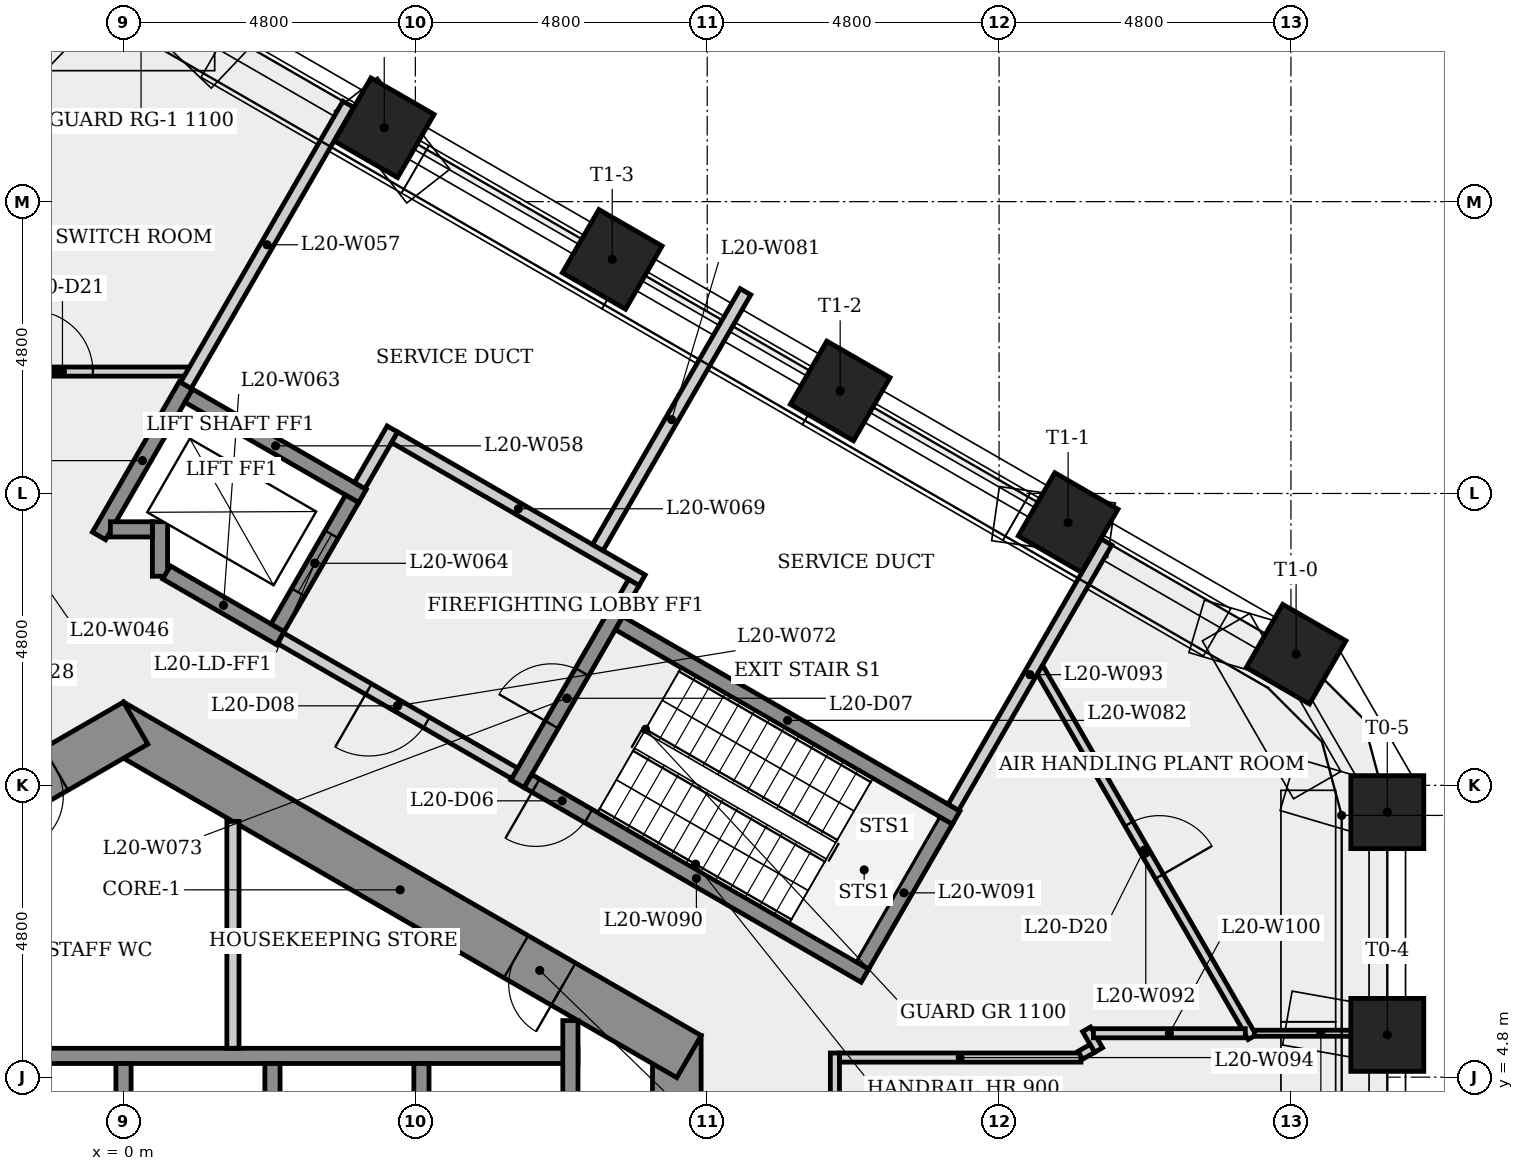
"""IFC4 building model, lengths in metres.
Left out: names, types, materials, properties, quantities, classifications, styles, units other than length and angle.
Written with IfcOpenShell. Run it as: python <this file> out.ifc"""

import sys

from ifc_helpers import new_model, si_unit, direction, frame, frame_2d, origin, origin_2d, place, context, subcontext, project, spatial, rectangle, extrude, element, fill, save


model = new_model("IFC4")
c1 = context("Model", 3, precision=1e-05, world=origin(), true_north=direction((0.0, 1.0)))
c2 = subcontext(c1, "Body", "Model", "MODEL_VIEW")
j1 = project(units=[si_unit("LENGTHUNIT", "METRE"), si_unit("PLANEANGLEUNIT", "RADIAN")], contexts=[c1])
p1 = place(None, origin())
s1 = spatial("IfcSite", under=j1, at=p1, CompositionType="ELEMENT")
p2 = place(p1, origin())
s2 = spatial("IfcBuilding", under=s1, at=p2, CompositionType="ELEMENT")
p3 = place(p2, frame((0.0, 0.0, 78.3)))
s3 = spatial("IfcBuildingStorey", under=s2, at=p3, CompositionType="ELEMENT", Elevation=78.3)
p4 = place(p3, frame((9.1, -5.485, 0.0), z_axis=(0.0, 0.0, 1.0), x_axis=(0.0, 1.0, 0.0)))
e1 = element("IfcWall", 1, at=p4, inside=s3, PredefinedType="SHEAR", context=c2, shape_type="SweptSolid", body=[
    extrude(rectangle(XDim=10.97, YDim=0.8, at=frame_2d((5.485, 0.0))), origin(), (0.0, 0.0, 1.0), 4.8),
])
p5 = place(p4, frame((4.685, 0.0, 0.0)))
e2 = element("IfcOpeningElement", 2, at=p5, cuts=e1, PredefinedType="OPENING", context=c2, shape_type="SweptSolid", body=[
    extrude(rectangle(XDim=1.6, YDim=2.1, at=frame_2d((0.8, 1.05))), frame((0.0, 0.41, 0.0), z_axis=(0.0, -1.0, 0.0), x_axis=(1.0, 0.0, 0.0)), (0.0, 0.0, 1.0), 0.82),
])
p6 = place(p3, frame((9.3, 5.138, 0.0), z_axis=(0.0, 0.0, 1.0), x_axis=(-0.866023993627, 0.500002442456, 0.0)))
e3 = element("IfcWall", 3, at=p6, inside=s3, PredefinedType="SHEAR", context=c2, shape_type="SweptSolid", body=[
    extrude(rectangle(XDim=10.97, YDim=0.8, at=frame_2d((5.485, 0.0))), origin(), (0.0, 0.0, 1.0), 4.8),
])
p7 = place(p6, frame((2.384, 0.0, 0.0)))
e4 = element("IfcOpeningElement", 4, at=p7, cuts=e3, PredefinedType="OPENING", context=c2, shape_type="SweptSolid", body=[
    extrude(rectangle(XDim=0.9, YDim=2.1, at=frame_2d((0.45, 1.05))), frame((0.0, 0.41, 0.0), z_axis=(0.0, -1.0, 0.0), x_axis=(1.0, 0.0, 0.0)), (0.0, 0.0, 1.0), 0.82),
])
p8 = place(p3, frame((0.2, 10.623, 0.0), z_axis=(0.0, 0.0, 1.0), x_axis=(-0.866023993627, -0.500002442456, 0.0)))
e5 = element("IfcWall", 5, at=p8, inside=s3, PredefinedType="SHEAR", context=c2, shape_type="SweptSolid", body=[
    extrude(rectangle(XDim=10.97, YDim=0.8, at=frame_2d((5.485, 0.0))), origin(), (0.0, 0.0, 1.0), 4.8),
])
p9 = place(p8, frame((7.947, 0.0, 0.0)))
e6 = element("IfcOpeningElement", 6, at=p9, cuts=e5, PredefinedType="OPENING", context=c2, shape_type="SweptSolid", body=[
    extrude(rectangle(XDim=0.9, YDim=2.1, at=frame_2d((0.45, 1.05))), frame((0.0, 0.41, 0.0), z_axis=(0.0, -1.0, 0.0), x_axis=(1.0, 0.0, 0.0)), (0.0, 0.0, 1.0), 0.82),
])
p10 = place(p8, frame((1.514, 0.0, 0.0)))
e7 = element("IfcOpeningElement", 7, at=p10, cuts=e5, PredefinedType="OPENING", context=c2, shape_type="SweptSolid", body=[
    extrude(rectangle(XDim=0.9, YDim=2.1, at=frame_2d((0.45, 1.05))), frame((0.0, 0.41, 0.0), z_axis=(0.0, -1.0, 0.0), x_axis=(1.0, 0.0, 0.0)), (0.0, 0.0, 1.0), 0.82),
])
for number, where, z_axis, x_axis in (
    (8, (20.785, 5.495, 0.0), (0.0, 0.0, 1.0), (1.0, 0.0, 0.0)),
    (9, (20.785, 9.159, 0.0), (0.0, 0.0, 1.0), (1.0, 0.0, 0.0)),
    (10, (19.285, 11.757, 0.0), (0.0, 0.0, 1.0), (0.5, 0.866, 0.0)),
    (11, (15.536, 13.921, 0.0), (0.0, 0.0, 1.0), (0.5, 0.866, 0.0)),
    (12, (11.787, 16.086, 0.0), (0.0, 0.0, 1.0), (0.5, 0.866, 0.0)),
    (13, (8.038, 18.25, 0.0), (0.0, 0.0, 1.0), (0.5, 0.866, 0.0)),
    (14, (4.289, 20.415, 0.0), (0.0, 0.0, 1.0), (0.5, 0.866, 0.0)),
):
    element("IfcColumn", number, at=place(p3, frame(where, z_axis=z_axis, x_axis=x_axis)), inside=s3, PredefinedType="COLUMN", context=c2, shape_type="SweptSolid", body=[
        extrude(rectangle(XDim=1.2, YDim=1.2, at=origin_2d()), origin(), (0.0, 0.0, 1.0), 4.45),
    ])
p11 = place(p3, frame((-7.225, 5.15, 0.0), z_axis=(0.0, 0.0, 1.0), x_axis=(1.0, 0.0, 0.0)))
e15 = element("IfcWall", 15, at=p11, inside=s3, PredefinedType="SHEAR", context=c2, shape_type="SweptSolid", body=[
    extrude(rectangle(XDim=14.7, YDim=0.25, at=frame_2d((7.35, 0.0))), origin(), (0.0, 0.0, 1.0), 4.45),
])
p12 = place(p3, frame((-3.275, 16.405, 0.0), z_axis=(0.0, 0.0, 1.0), x_axis=(1.0, 0.0, 0.0)))
e16 = element("IfcWall", 16, at=p12, inside=s3, PredefinedType="PARTITIONING", context=c2, shape_type="SweptSolid", body=[
    extrude(rectangle(XDim=4.333, YDim=0.15, at=frame_2d((2.166, 0.0))), origin(), (0.0, 0.0, 1.0), 4.45),
])
p13 = place(p12, frame((1.771, 0.0, 0.0)))
e17 = element("IfcOpeningElement", 17, at=p13, cuts=e16, PredefinedType="OPENING", context=c2, shape_type="SweptSolid", body=[
    extrude(rectangle(XDim=1.0, YDim=2.1, at=frame_2d((0.5, 1.05))), frame((0.0, 0.085, 0.0), z_axis=(0.0, -1.0, 0.0), x_axis=(1.0, 0.0, 0.0)), (0.0, 0.0, 1.0), 0.17),
])
p14 = place(p3, frame((-0.403, 13.702, 0.0), z_axis=(0.0, 0.0, 1.0), x_axis=(0.499976111731, 0.866039195244, 0.0)))
e18 = element("IfcWall", 18, at=p14, inside=s3, PredefinedType="SHEAR", context=c2, shape_type="SweptSolid", body=[
    extrude(rectangle(XDim=2.861, YDim=0.25, at=frame_2d((1.43, 0.0))), origin(), (0.0, 0.0, 1.0), 4.45),
])
p15 = place(p3, frame((0.0, 5.025, 0.0), z_axis=(0.0, 0.0, 1.0), x_axis=(0.0, -1.0, 0.0)))
e19 = element("IfcWall", 19, at=p15, inside=s3, PredefinedType="SHEAR", context=c2, shape_type="SweptSolid", body=[
    extrude(rectangle(XDim=3.1, YDim=0.25, at=frame_2d((1.55, 0.0))), origin(), (0.0, 0.0, 1.0), 4.8),
])
p16 = place(p3, frame((0.6, 13.039, 0.0), z_axis=(0.0, 0.0, 1.0), x_axis=(0.0, 1.0, 0.0)))
e20 = element("IfcWall", 20, at=p16, inside=s3, PredefinedType="SHEAR", context=c2, shape_type="SweptSolid", body=[
    extrude(rectangle(XDim=0.896, YDim=0.25, at=frame_2d((0.448, 0.0))), origin(), (0.0, 0.0, 1.0), 4.45),
])
p17 = place(p3, frame((0.475, 13.81, 0.0), z_axis=(0.0, 0.0, 1.0), x_axis=(-1.0, 0.0, 0.0)))
e21 = element("IfcWall", 21, at=p17, inside=s3, PredefinedType="SHEAR", context=c2, shape_type="SweptSolid", body=[
    extrude(rectangle(XDim=0.691, YDim=0.25, at=frame_2d((0.345, 0.0))), origin(), (0.0, 0.0, 1.0), 4.8),
])
p18 = place(p3, frame((1.027, 16.179, 0.0), z_axis=(0.0, 0.0, 1.0), x_axis=(0.499995631649, 0.866027925839, 0.0)))
e22 = element("IfcWall", 22, at=p18, inside=s3, PredefinedType="PLUMBINGWALL", context=c2, shape_type="SweptSolid", body=[
    extrude(rectangle(XDim=5.338, YDim=0.2, at=frame_2d((2.669, 0.0))), origin(), (0.0, 0.0, 1.0), 4.45),
])
p19 = place(p3, frame((1.073, 16.008, 0.0), z_axis=(0.0, 0.0, 1.0), x_axis=(0.866040211805, -0.499974350878, 0.0)))
e23 = element("IfcWall", 23, at=p19, inside=s3, PredefinedType="SHEAR", context=c2, shape_type="SweptSolid", body=[
    extrude(rectangle(XDim=3.3, YDim=0.25, at=frame_2d((1.65, 0.0))), origin(), (0.0, 0.0, 1.0), 4.45),
])
p20 = place(p3, frame((1.8, 9.007, 0.0), z_axis=(0.0, 0.0, 1.0), x_axis=(0.0, -1.0, 0.0)))
e24 = element("IfcWall", 24, at=p20, inside=s3, PredefinedType="PARTITIONING", context=c2, shape_type="SweptSolid", body=[
    extrude(rectangle(XDim=3.732, YDim=0.2, at=frame_2d((1.866, 0.0))), origin(), (0.0, 0.0, 1.0), 4.45),
])
p21 = place(p3, frame((2.45, 5.025, 0.0), z_axis=(0.0, 0.0, 1.0), x_axis=(0.0, -1.0, 0.0)))
e25 = element("IfcWall", 25, at=p21, inside=s3, PredefinedType="SHEAR", context=c2, shape_type="SweptSolid", body=[
    extrude(rectangle(XDim=3.1, YDim=0.25, at=frame_2d((1.55, 0.0))), origin(), (0.0, 0.0, 1.0), 4.8),
])
p22 = place(p3, frame((2.581, 12.02, 0.0), z_axis=(0.0, 0.0, 1.0), x_axis=(-0.86603892542, 0.499976579108, 0.0)))
e26 = element("IfcWall", 26, at=p22, inside=s3, PredefinedType="SHEAR", context=c2, shape_type="SweptSolid", body=[
    extrude(rectangle(XDim=2.162, YDim=0.25, at=frame_2d((1.081, 0.0))), origin(), (0.0, 0.0, 1.0), 4.45),
])
p23 = place(p3, frame((2.535, 12.191, 0.0), z_axis=(0.0, 0.0, 1.0), x_axis=(0.500061746146, 0.865989751695, 0.0)))
e27 = element("IfcWall", 27, at=p23, inside=s3, PredefinedType="SHEAR", context=c2, shape_type="SweptSolid", body=[
    extrude(rectangle(XDim=2.45, YDim=0.25, at=frame_2d((1.225, 0.0))), origin(), (0.0, 0.0, 1.0), 4.8),
])
p24 = place(p23, frame((0.675, 0.0, 0.0)))
e28 = element("IfcOpeningElement", 28, at=p24, cuts=e27, PredefinedType="OPENING", context=c2, shape_type="SweptSolid", body=[
    extrude(rectangle(XDim=1.1, YDim=2.1, at=frame_2d((0.55, 1.05))), frame((0.0, 0.135, 0.0), z_axis=(0.0, -1.0, 0.0), x_axis=(1.0, 0.0, 0.0)), (0.0, 0.0, 1.0), 0.27),
])
p25 = place(p3, frame((3.885, 14.529, 0.0), z_axis=(0.0, 0.0, 1.0), x_axis=(0.499997628298, 0.866026773083, 0.0)))
e29 = element("IfcWall", 29, at=p25, inside=s3, PredefinedType="PLUMBINGWALL", context=c2, shape_type="SweptSolid", body=[
    extrude(rectangle(XDim=1.075, YDim=0.2, at=frame_2d((0.538, 0.0))), origin(), (0.0, 0.0, 1.0), 4.45),
])
p26 = place(p3, frame((4.459, 15.323, 0.0), z_axis=(0.0, 0.0, 1.0), x_axis=(0.866016039709, -0.500016218704, 0.0)))
e30 = element("IfcWall", 30, at=p26, inside=s3, PredefinedType="PLUMBINGWALL", context=c2, shape_type="SweptSolid", body=[
    extrude(rectangle(XDim=4.7, YDim=0.2, at=frame_2d((2.35, 0.0))), origin(), (0.0, 0.0, 1.0), 4.45),
])
p27 = place(p3, frame((4.9, 5.025, 0.0), z_axis=(0.0, 0.0, 1.0), x_axis=(0.0, -1.0, 0.0)))
e31 = element("IfcWall", 31, at=p27, inside=s3, PredefinedType="SHEAR", context=c2, shape_type="SweptSolid", body=[
    extrude(rectangle(XDim=3.1, YDim=0.25, at=frame_2d((1.55, 0.0))), origin(), (0.0, 0.0, 1.0), 4.8),
])
p28 = place(p3, frame((6.435, 9.795, 0.0), z_axis=(0.0, 0.0, 1.0), x_axis=(-0.866012907634, 0.500021643343, 0.0)))
e32 = element("IfcWall", 32, at=p28, inside=s3, PredefinedType="PARTITIONING", context=c2, shape_type="SweptSolid", body=[
    extrude(rectangle(XDim=4.45, YDim=0.2, at=frame_2d((2.225, 0.0))), origin(), (0.0, 0.0, 1.0), 4.45),
])
p29 = place(p28, frame((1.675, 0.0, 0.0)))
e33 = element("IfcOpeningElement", 33, at=p29, cuts=e32, PredefinedType="OPENING", context=c2, shape_type="SweptSolid", body=[
    extrude(rectangle(XDim=1.1, YDim=2.1, at=frame_2d((0.55, 1.05))), frame((0.0, 0.11, 0.0), z_axis=(0.0, -1.0, 0.0), x_axis=(1.0, 0.0, 0.0)), (0.0, 0.0, 1.0), 0.22),
])
p30 = place(p3, frame((6.48, 9.624, 0.0), z_axis=(0.0, 0.0, 1.0), x_axis=(0.500017246033, 0.866015446554, 0.0)))
e34 = element("IfcWall", 34, at=p30, inside=s3, PredefinedType="SHEAR", context=c2, shape_type="SweptSolid", body=[
    extrude(rectangle(XDim=3.25, YDim=0.25, at=frame_2d((1.625, 0.0))), origin(), (0.0, 0.0, 1.0), 4.45),
])
p31 = place(p30, frame((1.125, 0.0, 0.0)))
e35 = element("IfcOpeningElement", 35, at=p31, cuts=e34, PredefinedType="OPENING", context=c2, shape_type="SweptSolid", body=[
    extrude(rectangle(XDim=1.0, YDim=2.1, at=frame_2d((0.5, 1.05))), frame((0.0, 0.135, 0.0), z_axis=(0.0, -1.0, 0.0), x_axis=(1.0, 0.0, 0.0)), (0.0, 0.0, 1.0), 0.27),
])
p32 = place(p3, frame((7.35, 5.73, 0.0), z_axis=(0.0, 0.0, 1.0), x_axis=(0.0, -1.0, 0.0)))
e36 = element("IfcWall", 36, at=p32, inside=s3, PredefinedType="SHEAR", context=c2, shape_type="SweptSolid", body=[
    extrude(rectangle(XDim=3.805, YDim=0.25, at=frame_2d((1.903, 0.0))), origin(), (0.0, 0.0, 1.0), 4.45),
])
p33 = place(p3, frame((7.8, 13.51, 0.0), z_axis=(0.0, 0.0, 1.0), x_axis=(0.499992114976, 0.866029956157, 0.0)))
e37 = element("IfcWall", 37, at=p33, inside=s3, PredefinedType="PLUMBINGWALL", context=c2, shape_type="SweptSolid", body=[
    extrude(rectangle(XDim=4.859, YDim=0.2, at=frame_2d((2.429, 0.0))), origin(), (0.0, 0.0, 1.0), 4.45),
])
p34 = place(p3, frame((8.151, 12.268, 0.0), z_axis=(0.0, 0.0, 1.0), x_axis=(0.866025499775, -0.499999833739, 0.0)))
e38 = element("IfcWall", 38, at=p34, inside=s3, PredefinedType="SHEAR", context=c2, shape_type="SweptSolid", body=[
    extrude(rectangle(XDim=6.4, YDim=0.25, at=frame_2d((3.2, 0.0))), origin(), (0.0, 0.0, 1.0), 4.45),
])
p35 = place(p3, frame((8.393, 12.937, 0.0), z_axis=(0.0, 0.0, 1.0), x_axis=(-0.500065409566, -0.86598763626, 0.0)))
e39 = element("IfcWall", 39, at=p35, inside=s3, PredefinedType="PLUMBINGWALL", context=c2, shape_type="SweptSolid", body=[
    extrude(rectangle(XDim=0.575, YDim=0.2, at=frame_2d((0.288, 0.0))), origin(), (0.0, 0.0, 1.0), 4.45),
])
p36 = place(p3, frame((11.7, 5.197, 0.0), z_axis=(0.0, 0.0, 1.0), x_axis=(0.0, -1.0, 0.0)))
e40 = element("IfcWall", 40, at=p36, inside=s3, PredefinedType="PARTITIONING", context=c2, shape_type="SweptSolid", body=[
    extrude(rectangle(XDim=10.645, YDim=0.15, at=frame_2d((5.322, 0.0))), origin(), (0.0, 0.0, 1.0), 4.45),
])
p37 = place(p36, frame((4.86, 0.0, 0.0)))
e41 = element("IfcOpeningElement", 41, at=p37, cuts=e40, PredefinedType="OPENING", context=c2, shape_type="SweptSolid", body=[
    extrude(rectangle(XDim=1.0, YDim=2.1, at=frame_2d((0.5, 1.05))), frame((0.0, 0.085, 0.0), z_axis=(0.0, -1.0, 0.0), x_axis=(1.0, 0.0, 0.0)), (0.0, 0.0, 1.0), 0.17),
])
p38 = place(p3, frame((12.194, 6.47, 0.0), z_axis=(0.0, 0.0, 1.0), x_axis=(-0.866025499775, 0.499999833739, 0.0)))
e42 = element("IfcWall", 42, at=p38, inside=s3, PredefinedType="SHEAR", context=c2, shape_type="SweptSolid", body=[
    extrude(rectangle(XDim=6.4, YDim=0.25, at=frame_2d((3.2, 0.0))), origin(), (0.0, 0.0, 1.0), 4.45),
])
p39 = place(p38, frame((5.25, 0.0, 0.0)))
e43 = element("IfcOpeningElement", 43, at=p39, cuts=e42, PredefinedType="OPENING", context=c2, shape_type="SweptSolid", body=[
    extrude(rectangle(XDim=1.0, YDim=2.1, at=frame_2d((0.5, 1.05))), frame((0.0, 0.135, 0.0), z_axis=(0.0, -1.0, 0.0), x_axis=(1.0, 0.0, 0.0)), (0.0, 0.0, 1.0), 0.27),
])
p40 = place(p3, frame((13.523, 9.022, 0.0), z_axis=(0.0, 0.0, 1.0), x_axis=(-0.500034990121, -0.866005201286, 0.0)))
e44 = element("IfcWall", 44, at=p40, inside=s3, PredefinedType="SHEAR", context=c2, shape_type="SweptSolid", body=[
    extrude(rectangle(XDim=2.75, YDim=0.25, at=frame_2d((1.375, 0.0))), origin(), (0.0, 0.0, 1.0), 4.45),
])
p41 = place(p3, frame((15.063, 11.517, 0.0), z_axis=(0.0, 0.0, 1.0), x_axis=(0.500015411963, -0.866016505501, 0.0)))
e45 = element("IfcWall", 45, at=p41, inside=s3, PredefinedType="PARTITIONING", context=c2, shape_type="SweptSolid", body=[
    extrude(rectangle(XDim=6.997, YDim=0.15, at=frame_2d((3.499, 0.0))), origin(), (0.0, 0.0, 1.0), 4.45),
])
p42 = place(p41, frame((2.944, 0.0, 0.0)))
e46 = element("IfcOpeningElement", 46, at=p42, cuts=e45, PredefinedType="OPENING", context=c2, shape_type="SweptSolid", body=[
    extrude(rectangle(XDim=1.0, YDim=2.1, at=frame_2d((0.5, 1.05))), frame((0.0, 0.085, 0.0), z_axis=(0.0, -1.0, 0.0), x_axis=(1.0, 0.0, 0.0)), (0.0, 0.0, 1.0), 0.17),
])
p43 = place(p3, frame((13.648, 9.239, 0.0), z_axis=(0.0, 0.0, 1.0), x_axis=(0.500006299954, 0.866021766474, 0.0)))
e47 = element("IfcWall", 47, at=p43, inside=s3, PredefinedType="PLUMBINGWALL", context=c2, shape_type="SweptSolid", body=[
    extrude(rectangle(XDim=5.038, YDim=0.2, at=frame_2d((2.519, 0.0))), origin(), (0.0, 0.0, 1.0), 4.45),
])
p44 = place(p3, frame((15.747, 5.122, 0.0), z_axis=(0.0, 0.0, 1.0), x_axis=(-1.0, 0.0, 0.0)))
e48 = element("IfcWall", 48, at=p44, inside=s3, PredefinedType="PARTITIONING", context=c2, shape_type="SweptSolid", body=[
    extrude(rectangle(XDim=3.972, YDim=0.15, at=frame_2d((1.986, 0.0))), origin(), (0.0, 0.0, 1.0), 4.45),
])
p45 = place(p3, frame((15.84, 5.587, 0.0), z_axis=(0.0, 0.0, 1.0), x_axis=(0.499740345343, -0.866175263579, 0.0)))
e49 = element("IfcWall", 49, at=p45, inside=s3, PredefinedType="PARTITIONING", context=c2, shape_type="SweptSolid", body=[
    extrude(rectangle(XDim=0.394, YDim=0.15, at=frame_2d((0.197, 0.0))), origin(), (0.0, 0.0, 1.0), 4.45),
])
p46 = place(p3, frame((15.934, 5.273, 0.0), z_axis=(0.0, 0.0, 1.0), x_axis=(-0.866256971229, -0.499598698754, 0.0)))
e50 = element("IfcWall", 50, at=p46, inside=s3, PredefinedType="PARTITIONING", context=c2, shape_type="SweptSolid", body=[
    extrude(rectangle(XDim=0.228, YDim=0.15, at=frame_2d((0.114, 0.0))), origin(), (0.0, 0.0, 1.0), 4.45),
])
p47 = place(p3, frame((18.599, 5.522, 0.0), z_axis=(0.0, 0.0, 1.0), x_axis=(1.0, 0.0, 0.0)))
e51 = element("IfcWall", 51, at=p47, inside=s3, PredefinedType="PARTITIONING", context=c2, shape_type="SweptSolid", body=[
    extrude(rectangle(XDim=2.185, YDim=0.1, at=frame_2d((1.093, 0.0))), origin(), (0.0, 0.0, 1.0), 2.425),
])
p48 = place(p3, frame((18.449, 5.522, 0.0), z_axis=(0.0, 0.0, 1.0), x_axis=(-1.0, 0.0, 0.0)))
e52 = element("IfcWall", 52, at=p48, inside=s3, PredefinedType="PARTITIONING", context=c2, shape_type="SweptSolid", body=[
    extrude(rectangle(XDim=2.498, YDim=0.15, at=frame_2d((1.249, 0.0))), origin(), (0.0, 0.0, 1.0), 4.45),
])
p49 = place(p39, origin())
e53 = element("IfcDoor", 53, at=p49, inside=s3, OperationType="SINGLE_SWING_RIGHT", PredefinedType="DOOR", context=c2, shape_type="SweptSolid", body=[
    extrude(rectangle(XDim=1.0, YDim=2.1, at=frame_2d((0.5, 1.05))), frame((0.0, 0.025, 0.0), z_axis=(0.0, -1.0, 0.0), x_axis=(1.0, 0.0, 0.0)), (0.0, 0.0, 1.0), 0.05),
])
fill(e43, e53)
p50 = place(p31, origin())
e54 = element("IfcDoor", 54, at=p50, inside=s3, OperationType="SINGLE_SWING_LEFT", PredefinedType="DOOR", context=c2, shape_type="SweptSolid", body=[
    extrude(rectangle(XDim=1.0, YDim=2.1, at=frame_2d((0.5, 1.05))), frame((0.0, 0.025, 0.0), z_axis=(0.0, -1.0, 0.0), x_axis=(1.0, 0.0, 0.0)), (0.0, 0.0, 1.0), 0.05),
])
fill(e35, e54)
p51 = place(p29, origin())
e55 = element("IfcDoor", 55, at=p51, inside=s3, OperationType="SINGLE_SWING_RIGHT", PredefinedType="DOOR", context=c2, shape_type="SweptSolid", body=[
    extrude(rectangle(XDim=1.1, YDim=2.1, at=frame_2d((0.55, 1.05))), frame((0.0, 0.025, 0.0), z_axis=(0.0, -1.0, 0.0), x_axis=(1.0, 0.0, 0.0)), (0.0, 0.0, 1.0), 0.05),
])
fill(e33, e55)
p52 = place(p24, origin())
e56 = element("IfcDoor", 56, at=p52, inside=s3, OperationType="SLIDING_TO_LEFT", PredefinedType="DOOR", context=c2, shape_type="SweptSolid", body=[
    extrude(rectangle(XDim=1.1, YDim=2.1, at=frame_2d((0.55, 1.05))), frame((0.0, 0.025, 0.0), z_axis=(0.0, -1.0, 0.0), x_axis=(1.0, 0.0, 0.0)), (0.0, 0.0, 1.0), 0.05),
])
fill(e28, e56)
p53 = place(p42, origin())
e57 = element("IfcDoor", 57, at=p53, inside=s3, OperationType="SINGLE_SWING_RIGHT", PredefinedType="DOOR", context=c2, shape_type="SweptSolid", body=[
    extrude(rectangle(XDim=1.0, YDim=2.1, at=frame_2d((0.5, 1.05))), frame((0.0, 0.025, 0.0), z_axis=(0.0, -1.0, 0.0), x_axis=(1.0, 0.0, 0.0)), (0.0, 0.0, 1.0), 0.05),
])
fill(e46, e57)
p54 = place(p13, origin())
e58 = element("IfcDoor", 58, at=p54, inside=s3, OperationType="SINGLE_SWING_LEFT", PredefinedType="DOOR", context=c2, shape_type="SweptSolid", body=[
    extrude(rectangle(XDim=1.0, YDim=2.1, at=frame_2d((0.5, 1.05))), frame((0.0, 0.025, 0.0), z_axis=(0.0, -1.0, 0.0), x_axis=(1.0, 0.0, 0.0)), (0.0, 0.0, 1.0), 0.05),
])
fill(e17, e58)
p55 = place(p10, origin())
e59 = element("IfcDoor", 59, at=p55, inside=s3, OperationType="SINGLE_SWING_RIGHT", PredefinedType="DOOR", context=c2, shape_type="SweptSolid", body=[
    extrude(rectangle(XDim=0.9, YDim=2.1, at=frame_2d((0.45, 1.05))), frame((0.0, 0.025, 0.0), z_axis=(0.0, -1.0, 0.0), x_axis=(1.0, 0.0, 0.0)), (0.0, 0.0, 1.0), 0.05),
])
fill(e7, e59)
p56 = place(p7, origin())
e60 = element("IfcDoor", 60, at=p56, inside=s3, OperationType="SINGLE_SWING_LEFT", PredefinedType="DOOR", context=c2, shape_type="SweptSolid", body=[
    extrude(rectangle(XDim=0.9, YDim=2.1, at=frame_2d((0.45, 1.05))), frame((0.0, 0.025, 0.0), z_axis=(0.0, -1.0, 0.0), x_axis=(1.0, 0.0, 0.0)), (0.0, 0.0, 1.0), 0.05),
])
fill(e4, e60)
save(model, sys.argv[1])
